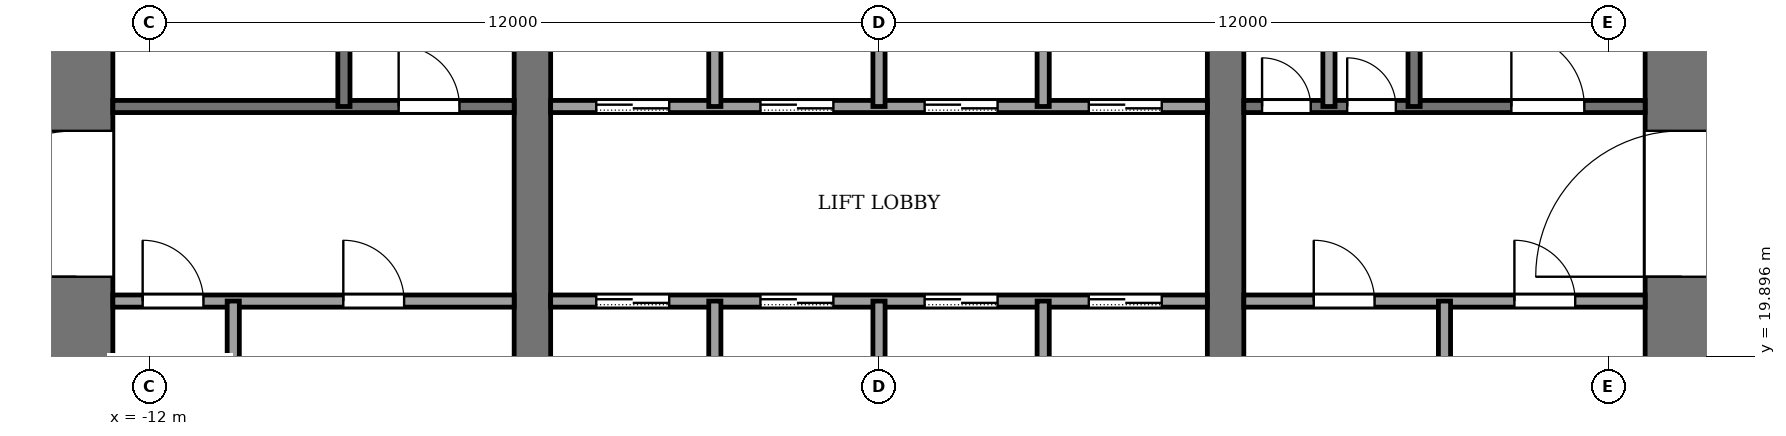
"""IFC4 building model, lengths in metres.
Left out: names, types, materials, properties, quantities, classifications, styles, units other than length and angle.
Written with IfcOpenShell. Run it as: python <this file> out.ifc"""

import sys

from ifc_helpers import new_model, si_unit, direction, frame, frame_2d, origin, place, context, subcontext, project, spatial, rectangle, extrude, element, fill, save


model = new_model("IFC4")
c1 = context("Model", 3, precision=1e-05, world=origin(), true_north=direction((0.0, 1.0)))
c2 = subcontext(c1, "Body", "Model", "MODEL_VIEW")
j1 = project(units=[si_unit("LENGTHUNIT", "METRE"), si_unit("PLANEANGLEUNIT", "RADIAN")], contexts=[c1])
p1 = place(None, origin())
s1 = spatial("IfcSite", under=j1, at=p1, CompositionType="ELEMENT")
p2 = place(p1, origin())
s2 = spatial("IfcBuilding", under=s1, at=p2, CompositionType="ELEMENT")
p3 = place(p2, frame((0.0, 0.0, 70.0)))
s3 = spatial("IfcBuildingStorey", under=s2, at=p3, CompositionType="ELEMENT", Elevation=70.0)
p4 = place(p3, frame((-13.2, 18.4, -0.13), z_axis=(0.0, 0.0, 1.0), x_axis=(0.0, 1.0, 0.0)))
e1 = element("IfcWall", 1, at=p4, inside=s3, PredefinedType="SHEAR", context=c2, shape_type="SweptSolid", body=[
    extrude(rectangle(XDim=19.2, YDim=1.2, at=frame_2d((9.6, 0.0))), origin(), (0.0, 0.0, 1.0), 4.0),
])
p5 = place(p4, frame((2.8, 0.0, 0.13)))
e2 = element("IfcOpeningElement", 2, at=p5, cuts=e1, PredefinedType="OPENING", context=c2, shape_type="SweptSolid", body=[
    extrude(rectangle(XDim=2.4, YDim=2.4, at=frame_2d((1.2, 1.2))), frame((0.0, 0.61, 0.0), z_axis=(0.0, -1.0, 0.0), x_axis=(1.0, 0.0, 0.0)), (0.0, 0.0, 1.0), 1.22),
])
p6 = place(p4, frame((13.4, 0.0, 0.13)))
e3 = element("IfcOpeningElement", 3, at=p6, cuts=e1, PredefinedType="OPENING", context=c2, shape_type="SweptSolid", body=[
    extrude(rectangle(XDim=1.4, YDim=2.2, at=frame_2d((0.7, 1.1))), frame((0.0, 0.61, 0.0), z_axis=(0.0, -1.0, 0.0), x_axis=(1.0, 0.0, 0.0)), (0.0, 0.0, 1.0), 1.22),
])
p7 = place(p3, frame((13.2, 18.4, -0.13), z_axis=(0.0, 0.0, 1.0), x_axis=(0.0, 1.0, 0.0)))
e4 = element("IfcWall", 4, at=p7, inside=s3, PredefinedType="SHEAR", context=c2, shape_type="SweptSolid", body=[
    extrude(rectangle(XDim=19.2, YDim=1.2, at=frame_2d((9.6, 0.0))), origin(), (0.0, 0.0, 1.0), 4.0),
])
p8 = place(p7, frame((2.8, 0.0, 0.13)))
e5 = element("IfcOpeningElement", 5, at=p8, cuts=e4, PredefinedType="OPENING", context=c2, shape_type="SweptSolid", body=[
    extrude(rectangle(XDim=2.4, YDim=2.4, at=frame_2d((1.2, 1.2))), frame((0.0, 0.61, 0.0), z_axis=(0.0, -1.0, 0.0), x_axis=(1.0, 0.0, 0.0)), (0.0, 0.0, 1.0), 1.22),
])
p9 = place(p7, frame((13.3, 0.0, 0.13)))
e6 = element("IfcOpeningElement", 6, at=p9, cuts=e4, PredefinedType="OPENING", context=c2, shape_type="SweptSolid", body=[
    extrude(rectangle(XDim=2.4, YDim=2.4, at=frame_2d((1.2, 1.2))), frame((0.0, 0.61, 0.0), z_axis=(0.0, -1.0, 0.0), x_axis=(1.0, 0.0, 0.0)), (0.0, 0.0, 1.0), 1.22),
])
p10 = place(p3, frame((-5.7, 18.4, -0.13), z_axis=(0.0, 0.0, 1.0), x_axis=(0.0, 1.0, 0.0)))
e7 = element("IfcWall", 7, at=p10, inside=s3, PredefinedType="SHEAR", context=c2, shape_type="SweptSolid", body=[
    extrude(rectangle(XDim=19.2, YDim=0.6, at=frame_2d((9.6, 0.0))), origin(), (0.0, 0.0, 1.0), 4.0),
])
p11 = place(p10, frame((8.35, 0.0, 0.13)))
e8 = element("IfcOpeningElement", 8, at=p11, cuts=e7, PredefinedType="OPENING", context=c2, shape_type="SweptSolid", body=[
    extrude(rectangle(XDim=0.9, YDim=2.1, at=frame_2d((0.45, 1.05))), frame((0.0, 0.31, 0.0), z_axis=(0.0, -1.0, 0.0), x_axis=(1.0, 0.0, 0.0)), (0.0, 0.0, 1.0), 0.62),
])
p12 = place(p3, frame((5.7, 18.4, -0.13), z_axis=(0.0, 0.0, 1.0), x_axis=(0.0, 1.0, 0.0)))
e9 = element("IfcWall", 9, at=p12, inside=s3, PredefinedType="SHEAR", context=c2, shape_type="SweptSolid", body=[
    extrude(rectangle(XDim=19.2, YDim=0.6, at=frame_2d((9.6, 0.0))), origin(), (0.0, 0.0, 1.0), 4.0),
])
p13 = place(p12, frame((13.3, 0.0, 0.13)))
e10 = element("IfcOpeningElement", 10, at=p13, cuts=e9, PredefinedType="OPENING", context=c2, shape_type="SweptSolid", body=[
    extrude(rectangle(XDim=2.4, YDim=2.4, at=frame_2d((1.2, 1.2))), frame((0.0, 0.31, 0.0), z_axis=(0.0, -1.0, 0.0), x_axis=(1.0, 0.0, 0.0)), (0.0, 0.0, 1.0), 0.62),
])
p14 = place(p3, frame((-12.6, 20.8, 0.0), z_axis=(0.0, 0.0, 1.0), x_axis=(1.0, 0.0, 0.0)))
e11 = element("IfcWall", 11, at=p14, inside=s3, PredefinedType="PARTITIONING", context=c2, shape_type="SweptSolid", body=[
    extrude(rectangle(XDim=6.6, YDim=0.2, at=frame_2d((3.3, 0.0))), origin(), (0.0, 0.0, 1.0), 3.87),
])
p15 = place(p14, frame((0.49, 0.0, 0.0)))
e12 = element("IfcOpeningElement", 12, at=p15, cuts=e11, PredefinedType="OPENING", context=c2, shape_type="SweptSolid", body=[
    extrude(rectangle(XDim=1.0, YDim=2.1, at=frame_2d((0.5, 1.05))), frame((0.0, 0.11, 0.0), z_axis=(0.0, -1.0, 0.0), x_axis=(1.0, 0.0, 0.0)), (0.0, 0.0, 1.0), 0.22),
])
p16 = place(p14, frame((3.79, 0.0, 0.0)))
e13 = element("IfcOpeningElement", 13, at=p16, cuts=e11, PredefinedType="OPENING", context=c2, shape_type="SweptSolid", body=[
    extrude(rectangle(XDim=1.0, YDim=2.1, at=frame_2d((0.5, 1.05))), frame((0.0, 0.11, 0.0), z_axis=(0.0, -1.0, 0.0), x_axis=(1.0, 0.0, 0.0)), (0.0, 0.0, 1.0), 0.22),
])
p17 = place(p3, frame((-5.4, 20.8, 0.0), z_axis=(0.0, 0.0, 1.0), x_axis=(1.0, 0.0, 0.0)))
e14 = element("IfcWall", 14, at=p17, inside=s3, PredefinedType="PARTITIONING", context=c2, shape_type="SweptSolid", body=[
    extrude(rectangle(XDim=10.8, YDim=0.2, at=frame_2d((5.4, 0.0))), origin(), (0.0, 0.0, 1.0), 3.87),
])
p18 = place(p17, frame((0.75, 0.0, 0.0)))
e15 = element("IfcOpeningElement", 15, at=p18, cuts=e14, PredefinedType="OPENING", context=c2, shape_type="SweptSolid", body=[
    extrude(rectangle(XDim=1.2, YDim=2.2, at=frame_2d((0.6, 1.1))), frame((0.0, 0.11, 0.0), z_axis=(0.0, -1.0, 0.0), x_axis=(1.0, 0.0, 0.0)), (0.0, 0.0, 1.0), 0.22),
])
p19 = place(p17, frame((3.45, 0.0, 0.0)))
e16 = element("IfcOpeningElement", 16, at=p19, cuts=e14, PredefinedType="OPENING", context=c2, shape_type="SweptSolid", body=[
    extrude(rectangle(XDim=1.2, YDim=2.2, at=frame_2d((0.6, 1.1))), frame((0.0, 0.11, 0.0), z_axis=(0.0, -1.0, 0.0), x_axis=(1.0, 0.0, 0.0)), (0.0, 0.0, 1.0), 0.22),
])
p20 = place(p17, frame((6.15, 0.0, 0.0)))
e17 = element("IfcOpeningElement", 17, at=p20, cuts=e14, PredefinedType="OPENING", context=c2, shape_type="SweptSolid", body=[
    extrude(rectangle(XDim=1.2, YDim=2.2, at=frame_2d((0.6, 1.1))), frame((0.0, 0.11, 0.0), z_axis=(0.0, -1.0, 0.0), x_axis=(1.0, 0.0, 0.0)), (0.0, 0.0, 1.0), 0.22),
])
p21 = place(p17, frame((8.85, 0.0, 0.0)))
e18 = element("IfcOpeningElement", 18, at=p21, cuts=e14, PredefinedType="OPENING", context=c2, shape_type="SweptSolid", body=[
    extrude(rectangle(XDim=1.2, YDim=2.2, at=frame_2d((0.6, 1.1))), frame((0.0, 0.11, 0.0), z_axis=(0.0, -1.0, 0.0), x_axis=(1.0, 0.0, 0.0)), (0.0, 0.0, 1.0), 0.22),
])
p22 = place(p3, frame((6.0, 20.8, 0.0), z_axis=(0.0, 0.0, 1.0), x_axis=(1.0, 0.0, 0.0)))
e19 = element("IfcWall", 19, at=p22, inside=s3, PredefinedType="PARTITIONING", context=c2, shape_type="SweptSolid", body=[
    extrude(rectangle(XDim=6.6, YDim=0.2, at=frame_2d((3.3, 0.0))), origin(), (0.0, 0.0, 1.0), 3.87),
])
p23 = place(p22, frame((1.15, 0.0, 0.0)))
e20 = element("IfcOpeningElement", 20, at=p23, cuts=e19, PredefinedType="OPENING", context=c2, shape_type="SweptSolid", body=[
    extrude(rectangle(XDim=1.0, YDim=2.1, at=frame_2d((0.5, 1.05))), frame((0.0, 0.11, 0.0), z_axis=(0.0, -1.0, 0.0), x_axis=(1.0, 0.0, 0.0)), (0.0, 0.0, 1.0), 0.22),
])
p24 = place(p22, frame((4.45, 0.0, 0.0)))
e21 = element("IfcOpeningElement", 21, at=p24, cuts=e19, PredefinedType="OPENING", context=c2, shape_type="SweptSolid", body=[
    extrude(rectangle(XDim=1.0, YDim=2.1, at=frame_2d((0.5, 1.05))), frame((0.0, 0.11, 0.0), z_axis=(0.0, -1.0, 0.0), x_axis=(1.0, 0.0, 0.0)), (0.0, 0.0, 1.0), 0.22),
])
p25 = place(p3, frame((-12.6, 24.0, 0.0), z_axis=(0.0, 0.0, 1.0), x_axis=(1.0, 0.0, 0.0)))
e22 = element("IfcWall", 22, at=p25, inside=s3, PredefinedType="PARTITIONING", context=c2, shape_type="SweptSolid", body=[
    extrude(rectangle(XDim=6.6, YDim=0.2, at=frame_2d((3.3, 0.0))), origin(), (0.0, 0.0, 1.0), 3.87),
])
p26 = place(p25, frame((4.7, 0.0, 0.0)))
e23 = element("IfcOpeningElement", 23, at=p26, cuts=e22, PredefinedType="OPENING", context=c2, shape_type="SweptSolid", body=[
    extrude(rectangle(XDim=1.0, YDim=2.1, at=frame_2d((0.5, 1.05))), frame((0.0, 0.11, 0.0), z_axis=(0.0, -1.0, 0.0), x_axis=(1.0, 0.0, 0.0)), (0.0, 0.0, 1.0), 0.22),
])
p27 = place(p3, frame((-5.4, 24.0, 0.0), z_axis=(0.0, 0.0, 1.0), x_axis=(1.0, 0.0, 0.0)))
e24 = element("IfcWall", 24, at=p27, inside=s3, PredefinedType="PARTITIONING", context=c2, shape_type="SweptSolid", body=[
    extrude(rectangle(XDim=10.8, YDim=0.2, at=frame_2d((5.4, 0.0))), origin(), (0.0, 0.0, 1.0), 3.87),
])
p28 = place(p27, frame((0.75, 0.0, 0.0)))
e25 = element("IfcOpeningElement", 25, at=p28, cuts=e24, PredefinedType="OPENING", context=c2, shape_type="SweptSolid", body=[
    extrude(rectangle(XDim=1.2, YDim=2.2, at=frame_2d((0.6, 1.1))), frame((0.0, 0.11, 0.0), z_axis=(0.0, -1.0, 0.0), x_axis=(1.0, 0.0, 0.0)), (0.0, 0.0, 1.0), 0.22),
])
p29 = place(p27, frame((3.45, 0.0, 0.0)))
e26 = element("IfcOpeningElement", 26, at=p29, cuts=e24, PredefinedType="OPENING", context=c2, shape_type="SweptSolid", body=[
    extrude(rectangle(XDim=1.2, YDim=2.2, at=frame_2d((0.6, 1.1))), frame((0.0, 0.11, 0.0), z_axis=(0.0, -1.0, 0.0), x_axis=(1.0, 0.0, 0.0)), (0.0, 0.0, 1.0), 0.22),
])
p30 = place(p27, frame((6.15, 0.0, 0.0)))
e27 = element("IfcOpeningElement", 27, at=p30, cuts=e24, PredefinedType="OPENING", context=c2, shape_type="SweptSolid", body=[
    extrude(rectangle(XDim=1.2, YDim=2.2, at=frame_2d((0.6, 1.1))), frame((0.0, 0.11, 0.0), z_axis=(0.0, -1.0, 0.0), x_axis=(1.0, 0.0, 0.0)), (0.0, 0.0, 1.0), 0.22),
])
p31 = place(p27, frame((8.85, 0.0, 0.0)))
e28 = element("IfcOpeningElement", 28, at=p31, cuts=e24, PredefinedType="OPENING", context=c2, shape_type="SweptSolid", body=[
    extrude(rectangle(XDim=1.2, YDim=2.2, at=frame_2d((0.6, 1.1))), frame((0.0, 0.11, 0.0), z_axis=(0.0, -1.0, 0.0), x_axis=(1.0, 0.0, 0.0)), (0.0, 0.0, 1.0), 0.22),
])
p32 = place(p3, frame((6.0, 24.0, 0.0), z_axis=(0.0, 0.0, 1.0), x_axis=(1.0, 0.0, 0.0)))
e29 = element("IfcWall", 29, at=p32, inside=s3, PredefinedType="PARTITIONING", context=c2, shape_type="SweptSolid", body=[
    extrude(rectangle(XDim=6.6, YDim=0.2, at=frame_2d((3.3, 0.0))), origin(), (0.0, 0.0, 1.0), 3.87),
])
p33 = place(p32, frame((0.3, 0.0, 0.0)))
e30 = element("IfcOpeningElement", 30, at=p33, cuts=e29, PredefinedType="OPENING", context=c2, shape_type="SweptSolid", body=[
    extrude(rectangle(XDim=0.8, YDim=2.1, at=frame_2d((0.4, 1.05))), frame((0.0, 0.11, 0.0), z_axis=(0.0, -1.0, 0.0), x_axis=(1.0, 0.0, 0.0)), (0.0, 0.0, 1.0), 0.22),
])
p34 = place(p32, frame((1.7, 0.0, 0.0)))
e31 = element("IfcOpeningElement", 31, at=p34, cuts=e29, PredefinedType="OPENING", context=c2, shape_type="SweptSolid", body=[
    extrude(rectangle(XDim=0.8, YDim=2.1, at=frame_2d((0.4, 1.05))), frame((0.0, 0.11, 0.0), z_axis=(0.0, -1.0, 0.0), x_axis=(1.0, 0.0, 0.0)), (0.0, 0.0, 1.0), 0.22),
])
p35 = place(p32, frame((4.4, 0.0, 0.0)))
e32 = element("IfcOpeningElement", 32, at=p35, cuts=e29, PredefinedType="OPENING", context=c2, shape_type="SweptSolid", body=[
    extrude(rectangle(XDim=1.2, YDim=2.2, at=frame_2d((0.6, 1.1))), frame((0.0, 0.11, 0.0), z_axis=(0.0, -1.0, 0.0), x_axis=(1.0, 0.0, 0.0)), (0.0, 0.0, 1.0), 0.22),
])
p36 = place(p3, frame((-10.62, 18.4, 0.0), z_axis=(0.0, 0.0, 1.0), x_axis=(0.0, 1.0, 0.0)))
e33 = element("IfcWall", 33, at=p36, inside=s3, PredefinedType="PARTITIONING", context=c2, shape_type="SweptSolid", body=[
    extrude(rectangle(XDim=2.4, YDim=0.2, at=frame_2d((1.2, 0.0))), origin(), (0.0, 0.0, 1.0), 3.87),
])
p37 = place(p3, frame((-8.8, 24.0, 0.0), z_axis=(0.0, 0.0, 1.0), x_axis=(0.0, 1.0, 0.0)))
e34 = element("IfcWall", 34, at=p37, inside=s3, PredefinedType="PARTITIONING", context=c2, shape_type="SweptSolid", body=[
    extrude(rectangle(XDim=7.4, YDim=0.2, at=frame_2d((3.7, 0.0))), origin(), (0.0, 0.0, 1.0), 3.87),
])
p38 = place(p3, frame((-2.7, 18.4, 0.0), z_axis=(0.0, 0.0, 1.0), x_axis=(0.0, 1.0, 0.0)))
e35 = element("IfcWall", 35, at=p38, inside=s3, PredefinedType="PARTITIONING", context=c2, shape_type="SweptSolid", body=[
    extrude(rectangle(XDim=2.4, YDim=0.2, at=frame_2d((1.2, 0.0))), origin(), (0.0, 0.0, 1.0), 3.87),
])
p39 = place(p3, frame((-2.7, 24.0, 0.0), z_axis=(0.0, 0.0, 1.0), x_axis=(0.0, 1.0, 0.0)))
e36 = element("IfcWall", 36, at=p39, inside=s3, PredefinedType="PARTITIONING", context=c2, shape_type="SweptSolid", body=[
    extrude(rectangle(XDim=2.4, YDim=0.2, at=frame_2d((1.2, 0.0))), origin(), (0.0, 0.0, 1.0), 3.87),
])
p40 = place(p3, frame((0.0, 18.4, 0.0), z_axis=(0.0, 0.0, 1.0), x_axis=(0.0, 1.0, 0.0)))
e37 = element("IfcWall", 37, at=p40, inside=s3, PredefinedType="PARTITIONING", context=c2, shape_type="SweptSolid", body=[
    extrude(rectangle(XDim=2.4, YDim=0.2, at=frame_2d((1.2, 0.0))), origin(), (0.0, 0.0, 1.0), 3.87),
])
p41 = place(p3, frame((0.0, 24.0, 0.0), z_axis=(0.0, 0.0, 1.0), x_axis=(0.0, 1.0, 0.0)))
e38 = element("IfcWall", 38, at=p41, inside=s3, PredefinedType="PARTITIONING", context=c2, shape_type="SweptSolid", body=[
    extrude(rectangle(XDim=2.4, YDim=0.2, at=frame_2d((1.2, 0.0))), origin(), (0.0, 0.0, 1.0), 3.87),
])
p42 = place(p3, frame((2.7, 18.4, 0.0), z_axis=(0.0, 0.0, 1.0), x_axis=(0.0, 1.0, 0.0)))
e39 = element("IfcWall", 39, at=p42, inside=s3, PredefinedType="PARTITIONING", context=c2, shape_type="SweptSolid", body=[
    extrude(rectangle(XDim=2.4, YDim=0.2, at=frame_2d((1.2, 0.0))), origin(), (0.0, 0.0, 1.0), 3.87),
])
p43 = place(p3, frame((2.7, 24.0, 0.0), z_axis=(0.0, 0.0, 1.0), x_axis=(0.0, 1.0, 0.0)))
e40 = element("IfcWall", 40, at=p43, inside=s3, PredefinedType="PARTITIONING", context=c2, shape_type="SweptSolid", body=[
    extrude(rectangle(XDim=2.4, YDim=0.2, at=frame_2d((1.2, 0.0))), origin(), (0.0, 0.0, 1.0), 3.87),
])
for number, where, z_axis, x_axis in (
    (41, (7.4, 24.0, 0.0), (0.0, 0.0, 1.0), (0.0, 1.0, 0.0)),
    (42, (8.8, 24.0, 0.0), (0.0, 0.0, 1.0), (0.0, 1.0, 0.0)),
):
    element("IfcWall", number, at=place(p3, frame(where, z_axis=z_axis, x_axis=x_axis)), inside=s3, PredefinedType="PARTITIONING", context=c2, shape_type="SweptSolid", body=[
        extrude(rectangle(XDim=7.4, YDim=0.2, at=frame_2d((3.7, 0.0))), origin(), (0.0, 0.0, 1.0), 3.87),
    ])
p44 = place(p3, frame((9.3, 18.4, 0.0), z_axis=(0.0, 0.0, 1.0), x_axis=(0.0, 1.0, 0.0)))
e43 = element("IfcWall", 43, at=p44, inside=s3, PredefinedType="PARTITIONING", context=c2, shape_type="SweptSolid", body=[
    extrude(rectangle(XDim=2.4, YDim=0.2, at=frame_2d((1.2, 0.0))), origin(), (0.0, 0.0, 1.0), 3.87),
])
p45 = place(p18, origin())
e44 = element("IfcDoor", 44, at=p45, inside=s3, OperationType="SLIDING_TO_LEFT", PredefinedType="DOOR", context=c2, shape_type="SweptSolid", body=[
    extrude(rectangle(XDim=1.2, YDim=2.2, at=frame_2d((0.6, 1.1))), frame((0.0, 0.025, 0.0), z_axis=(0.0, -1.0, 0.0), x_axis=(1.0, 0.0, 0.0)), (0.0, 0.0, 1.0), 0.05),
])
fill(e15, e44)
p46 = place(p19, origin())
e45 = element("IfcDoor", 45, at=p46, inside=s3, OperationType="SLIDING_TO_LEFT", PredefinedType="DOOR", context=c2, shape_type="SweptSolid", body=[
    extrude(rectangle(XDim=1.2, YDim=2.2, at=frame_2d((0.6, 1.1))), frame((0.0, 0.025, 0.0), z_axis=(0.0, -1.0, 0.0), x_axis=(1.0, 0.0, 0.0)), (0.0, 0.0, 1.0), 0.05),
])
fill(e16, e45)
p47 = place(p20, origin())
e46 = element("IfcDoor", 46, at=p47, inside=s3, OperationType="SLIDING_TO_LEFT", PredefinedType="DOOR", context=c2, shape_type="SweptSolid", body=[
    extrude(rectangle(XDim=1.2, YDim=2.2, at=frame_2d((0.6, 1.1))), frame((0.0, 0.025, 0.0), z_axis=(0.0, -1.0, 0.0), x_axis=(1.0, 0.0, 0.0)), (0.0, 0.0, 1.0), 0.05),
])
fill(e17, e46)
p48 = place(p21, origin())
e47 = element("IfcDoor", 47, at=p48, inside=s3, OperationType="SLIDING_TO_LEFT", PredefinedType="DOOR", context=c2, shape_type="SweptSolid", body=[
    extrude(rectangle(XDim=1.2, YDim=2.2, at=frame_2d((0.6, 1.1))), frame((0.0, 0.025, 0.0), z_axis=(0.0, -1.0, 0.0), x_axis=(1.0, 0.0, 0.0)), (0.0, 0.0, 1.0), 0.05),
])
fill(e18, e47)
p49 = place(p28, origin())
e48 = element("IfcDoor", 48, at=p49, inside=s3, OperationType="SLIDING_TO_LEFT", PredefinedType="DOOR", context=c2, shape_type="SweptSolid", body=[
    extrude(rectangle(XDim=1.2, YDim=2.2, at=frame_2d((0.6, 1.1))), frame((0.0, 0.025, 0.0), z_axis=(0.0, -1.0, 0.0), x_axis=(1.0, 0.0, 0.0)), (0.0, 0.0, 1.0), 0.05),
])
fill(e25, e48)
p50 = place(p29, origin())
e49 = element("IfcDoor", 49, at=p50, inside=s3, OperationType="SLIDING_TO_LEFT", PredefinedType="DOOR", context=c2, shape_type="SweptSolid", body=[
    extrude(rectangle(XDim=1.2, YDim=2.2, at=frame_2d((0.6, 1.1))), frame((0.0, 0.025, 0.0), z_axis=(0.0, -1.0, 0.0), x_axis=(1.0, 0.0, 0.0)), (0.0, 0.0, 1.0), 0.05),
])
fill(e26, e49)
p51 = place(p30, origin())
e50 = element("IfcDoor", 50, at=p51, inside=s3, OperationType="SLIDING_TO_LEFT", PredefinedType="DOOR", context=c2, shape_type="SweptSolid", body=[
    extrude(rectangle(XDim=1.2, YDim=2.2, at=frame_2d((0.6, 1.1))), frame((0.0, 0.025, 0.0), z_axis=(0.0, -1.0, 0.0), x_axis=(1.0, 0.0, 0.0)), (0.0, 0.0, 1.0), 0.05),
])
fill(e27, e50)
p52 = place(p31, origin())
e51 = element("IfcDoor", 51, at=p52, inside=s3, OperationType="SLIDING_TO_LEFT", PredefinedType="DOOR", context=c2, shape_type="SweptSolid", body=[
    extrude(rectangle(XDim=1.2, YDim=2.2, at=frame_2d((0.6, 1.1))), frame((0.0, 0.025, 0.0), z_axis=(0.0, -1.0, 0.0), x_axis=(1.0, 0.0, 0.0)), (0.0, 0.0, 1.0), 0.05),
])
fill(e28, e51)
p53 = place(p15, origin())
e52 = element("IfcDoor", 52, at=p53, inside=s3, OperationType="SINGLE_SWING_RIGHT", PredefinedType="DOOR", context=c2, shape_type="SweptSolid", body=[
    extrude(rectangle(XDim=1.0, YDim=2.1, at=frame_2d((0.5, 1.05))), frame((0.0, 0.025, 0.0), z_axis=(0.0, -1.0, 0.0), x_axis=(1.0, 0.0, 0.0)), (0.0, 0.0, 1.0), 0.05),
])
fill(e12, e52)
p54 = place(p16, origin())
e53 = element("IfcDoor", 53, at=p54, inside=s3, OperationType="SINGLE_SWING_RIGHT", PredefinedType="DOOR", context=c2, shape_type="SweptSolid", body=[
    extrude(rectangle(XDim=1.0, YDim=2.1, at=frame_2d((0.5, 1.05))), frame((0.0, 0.025, 0.0), z_axis=(0.0, -1.0, 0.0), x_axis=(1.0, 0.0, 0.0)), (0.0, 0.0, 1.0), 0.05),
])
fill(e13, e53)
p55 = place(p23, origin())
e54 = element("IfcDoor", 54, at=p55, inside=s3, OperationType="SINGLE_SWING_LEFT", PredefinedType="DOOR", context=c2, shape_type="SweptSolid", body=[
    extrude(rectangle(XDim=1.0, YDim=2.1, at=frame_2d((0.5, 1.05))), frame((0.0, 0.025, 0.0), z_axis=(0.0, -1.0, 0.0), x_axis=(1.0, 0.0, 0.0)), (0.0, 0.0, 1.0), 0.05),
])
fill(e20, e54)
p56 = place(p24, origin())
e55 = element("IfcDoor", 55, at=p56, inside=s3, OperationType="SINGLE_SWING_LEFT", PredefinedType="DOOR", context=c2, shape_type="SweptSolid", body=[
    extrude(rectangle(XDim=1.0, YDim=2.1, at=frame_2d((0.5, 1.05))), frame((0.0, 0.025, 0.0), z_axis=(0.0, -1.0, 0.0), x_axis=(1.0, 0.0, 0.0)), (0.0, 0.0, 1.0), 0.05),
])
fill(e21, e55)
p57 = place(p26, origin())
e56 = element("IfcDoor", 56, at=p57, inside=s3, OperationType="SINGLE_SWING_RIGHT", PredefinedType="DOOR", context=c2, shape_type="SweptSolid", body=[
    extrude(rectangle(XDim=1.0, YDim=2.1, at=frame_2d((0.5, 1.05))), frame((0.0, 0.025, 0.0), z_axis=(0.0, -1.0, 0.0), x_axis=(1.0, 0.0, 0.0)), (0.0, 0.0, 1.0), 0.05),
])
fill(e23, e56)
p58 = place(p33, origin())
e57 = element("IfcDoor", 57, at=p58, inside=s3, OperationType="SINGLE_SWING_RIGHT", PredefinedType="DOOR", context=c2, shape_type="SweptSolid", body=[
    extrude(rectangle(XDim=0.8, YDim=2.1, at=frame_2d((0.4, 1.05))), frame((0.0, 0.025, 0.0), z_axis=(0.0, -1.0, 0.0), x_axis=(1.0, 0.0, 0.0)), (0.0, 0.0, 1.0), 0.05),
])
fill(e30, e57)
p59 = place(p34, origin())
e58 = element("IfcDoor", 58, at=p59, inside=s3, OperationType="SINGLE_SWING_LEFT", PredefinedType="DOOR", context=c2, shape_type="SweptSolid", body=[
    extrude(rectangle(XDim=0.8, YDim=2.1, at=frame_2d((0.4, 1.05))), frame((0.0, 0.025, 0.0), z_axis=(0.0, -1.0, 0.0), x_axis=(1.0, 0.0, 0.0)), (0.0, 0.0, 1.0), 0.05),
])
fill(e31, e58)
p60 = place(p35, origin())
e59 = element("IfcDoor", 59, at=p60, inside=s3, OperationType="SINGLE_SWING_RIGHT", PredefinedType="DOOR", context=c2, shape_type="SweptSolid", body=[
    extrude(rectangle(XDim=1.2, YDim=2.2, at=frame_2d((0.6, 1.1))), frame((0.0, 0.025, 0.0), z_axis=(0.0, -1.0, 0.0), x_axis=(1.0, 0.0, 0.0)), (0.0, 0.0, 1.0), 0.05),
])
fill(e32, e59)
p61 = place(p5, origin())
e60 = element("IfcDoor", 60, at=p61, inside=s3, OperationType="DOUBLE_DOOR_SINGLE_SWING", PredefinedType="DOOR", context=c2, shape_type="SweptSolid", body=[
    extrude(rectangle(XDim=2.4, YDim=2.4, at=frame_2d((1.2, 1.2))), frame((0.0, 0.025, 0.0), z_axis=(0.0, -1.0, 0.0), x_axis=(1.0, 0.0, 0.0)), (0.0, 0.0, 1.0), 0.05),
])
fill(e2, e60)
p62 = place(p8, origin())
e61 = element("IfcDoor", 61, at=p62, inside=s3, OperationType="DOUBLE_DOOR_SINGLE_SWING", PredefinedType="DOOR", context=c2, shape_type="SweptSolid", body=[
    extrude(rectangle(XDim=2.4, YDim=2.4, at=frame_2d((1.2, 1.2))), frame((0.0, 0.025, 0.0), z_axis=(0.0, -1.0, 0.0), x_axis=(1.0, 0.0, 0.0)), (0.0, 0.0, 1.0), 0.05),
])
fill(e5, e61)
save(model, sys.argv[1])
